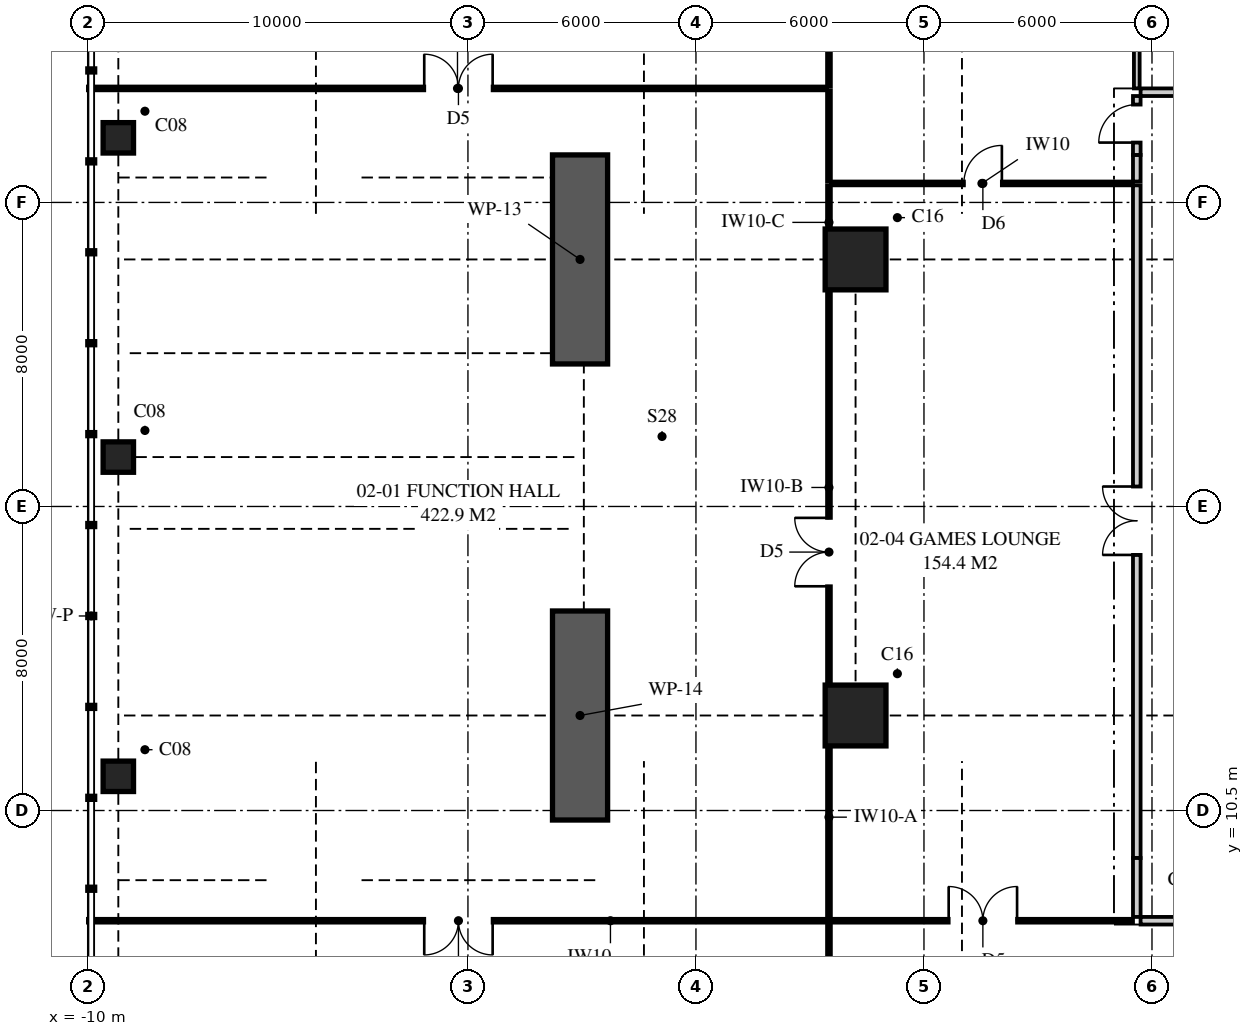
"""IFC4 building model, lengths in metres.
Left out: names, types, materials, properties, quantities, classifications, styles, units other than length and angle.
Written with IfcOpenShell. Run it as: python <this file> out.ifc"""

import sys

from ifc_helpers import new_model, si_unit, direction, frame, frame_2d, origin, origin_2d, place, context, subcontext, project, spatial, polyline, rectangle, outline, extrude, element, fill, save


model = new_model("IFC4")
c1 = context("Model", 3, precision=1e-05, world=origin(), true_north=direction((0.0, 1.0)))
c2 = subcontext(c1, "Body", "Model", "MODEL_VIEW")
j1 = project(units=[si_unit("LENGTHUNIT", "METRE"), si_unit("PLANEANGLEUNIT", "RADIAN")], contexts=[c1])
p1 = place(None, origin())
s1 = spatial("IfcSite", under=j1, at=p1, CompositionType="ELEMENT")
p2 = place(p1, origin())
s2 = spatial("IfcBuilding", under=s1, at=p2, CompositionType="ELEMENT")
p3 = place(p2, frame((0.0, 0.0, 11.0)))
s3 = spatial("IfcBuildingStorey", under=s2, at=p3, CompositionType="ELEMENT", Elevation=11.0)
for number, where, z_axis, x_axis in (
    (1, (10.2, 13.0, 0.0), (0.0, 0.0, 1.0), (1.0, 0.0, 0.0)),
    (2, (10.2, 25.0, 0.0), (0.0, 0.0, 1.0), (1.0, 0.0, 0.0)),
):
    element("IfcColumn", number, at=place(p3, frame(where, z_axis=z_axis, x_axis=x_axis)), inside=s3, PredefinedType="COLUMN", context=c2, shape_type="SweptSolid", body=[
        extrude(rectangle(XDim=1.6, YDim=1.6, at=origin_2d()), origin(), (0.0, 0.0, 1.0), 5.0),
    ])
for number, where, z_axis, x_axis in (
    (3, (-9.2, 11.4, 0.0), (0.0, 0.0, 1.0), (1.0, 0.0, 0.0)),
    (4, (-9.2, 19.8, 0.0), (0.0, 0.0, 1.0), (1.0, 0.0, 0.0)),
    (5, (-9.2, 28.2, 0.0), (0.0, 0.0, 1.0), (1.0, 0.0, 0.0)),
):
    element("IfcColumn", number, at=place(p3, frame(where, z_axis=z_axis, x_axis=x_axis)), inside=s3, PredefinedType="COLUMN", context=c2, shape_type="SweptSolid", body=[
        extrude(rectangle(XDim=0.8, YDim=0.8, at=origin_2d()), origin(), (0.0, 0.0, 1.0), 5.0),
    ])
p4 = place(p3, frame((-10.0, 29.5, 0.0), z_axis=(0.0, 0.0, 1.0), x_axis=(1.0, 0.0, 0.0)))
e6 = element("IfcWall", 6, at=p4, inside=s3, PredefinedType="PARTITIONING", context=c2, shape_type="SweptSolid", body=[
    extrude(outline(polyline([(0.0, 0.0), (19.45, 0.0), (19.45, 4.72), (15.891, 4.72), (15.891, 4.02), (13.371, 4.02), (13.371, 4.72), (7.26, 4.72), (7.26, 4.02), (4.74, 4.02), (4.74, 4.72), (1.16, 4.72), (1.16, 3.52), (0.44, 3.52), (0.44, 4.72), (0.0, 4.72), (0.0, 0.0)])), frame((0.0, 0.05, 0.0), z_axis=(0.0, -1.0, 0.0), x_axis=(1.0, 0.0, 0.0)), (0.0, 0.0, 1.0), 0.1),
])
p5 = place(p4, frame((8.85, 0.0, 0.0)))
e7 = element("IfcOpeningElement", 7, at=p5, cuts=e6, PredefinedType="OPENING", context=c2, shape_type="SweptSolid", body=[
    extrude(rectangle(XDim=1.8, YDim=2.1, at=frame_2d((0.9, 1.05))), frame((0.0, 0.06, 0.0), z_axis=(0.0, -1.0, 0.0), x_axis=(1.0, 0.0, 0.0)), (0.0, 0.0, 1.0), 0.12),
])
p6 = place(p3, frame((9.5, 7.65, 0.0), z_axis=(0.0, 0.0, 1.0), x_axis=(0.0, 1.0, 0.0)))
e8 = element("IfcWall", 8, at=p6, inside=s3, PredefinedType="PARTITIONING", context=c2, shape_type="SweptSolid", body=[
    extrude(outline(polyline([(0.0, 0.0), (5.35, 0.0), (5.35, 4.02), (4.09, 4.02), (4.09, 4.72), (0.0, 4.72), (0.0, 0.0)])), frame((0.0, 0.05, 0.0), z_axis=(0.0, -1.0, 0.0), x_axis=(1.0, 0.0, 0.0)), (0.0, 0.0, 1.0), 0.1),
])
p7 = place(p3, frame((9.5, 13.0, 0.0), z_axis=(0.0, 0.0, 1.0), x_axis=(0.0, 1.0, 0.0)))
e9 = element("IfcWall", 9, at=p7, inside=s3, PredefinedType="PARTITIONING", context=c2, shape_type="SweptSolid", body=[
    extrude(rectangle(XDim=12.0, YDim=0.1, at=frame_2d((6.0, 0.0))), origin(), (0.0, 0.0, 1.0), 4.02),
])
p8 = place(p7, frame((3.4, 0.0, 0.0)))
e10 = element("IfcOpeningElement", 10, at=p8, cuts=e9, PredefinedType="OPENING", context=c2, shape_type="SweptSolid", body=[
    extrude(rectangle(XDim=1.8, YDim=2.1, at=frame_2d((0.9, 1.05))), frame((0.0, 0.06, 0.0), z_axis=(0.0, -1.0, 0.0), x_axis=(1.0, 0.0, 0.0)), (0.0, 0.0, 1.0), 0.12),
])
p9 = place(p3, frame((9.5, 25.0, 0.0), z_axis=(0.0, 0.0, 1.0), x_axis=(0.0, 1.0, 0.0)))
e11 = element("IfcWall", 11, at=p9, inside=s3, PredefinedType="PARTITIONING", context=c2, shape_type="SweptSolid", body=[
    extrude(outline(polyline([(0.0, 0.0), (1.95, 0.0), (1.95, 4.72), (1.26, 4.72), (1.26, 4.02), (0.0, 4.02), (0.0, 0.0)])), frame((0.0, 0.05, 0.0), z_axis=(0.0, -1.0, 0.0), x_axis=(1.0, 0.0, 0.0)), (0.0, 0.0, 1.0), 0.1),
])
p10 = place(p3, frame((9.5, 27.05, 0.0), z_axis=(0.0, 0.0, 1.0), x_axis=(0.0, 1.0, 0.0)))
e12 = element("IfcWall", 12, at=p10, inside=s3, PredefinedType="PARTITIONING", context=c2, shape_type="SweptSolid", body=[
    extrude(rectangle(XDim=2.4, YDim=0.1, at=frame_2d((1.2, 0.0))), origin(), (0.0, 0.0, 1.0), 4.72),
])
p11 = place(p3, frame((-10.0, 7.6, 0.0), z_axis=(0.0, 0.0, 1.0), x_axis=(1.0, 0.0, 0.0)))
e13 = element("IfcWall", 13, at=p11, inside=s3, PredefinedType="PARTITIONING", context=c2, shape_type="SweptSolid", body=[
    extrude(outline(polyline([(0.0, 0.0), (19.45, 0.0), (19.45, 4.72), (15.891, 4.72), (15.891, 4.02), (13.371, 4.02), (13.371, 4.72), (7.26, 4.72), (7.26, 4.02), (4.74, 4.02), (4.74, 4.72), (1.16, 4.72), (1.16, 3.52), (0.44, 3.52), (0.44, 4.72), (0.0, 4.72), (0.0, 0.0)])), frame((0.0, 0.05, 0.0), z_axis=(0.0, -1.0, 0.0), x_axis=(1.0, 0.0, 0.0)), (0.0, 0.0, 1.0), 0.1),
])
p12 = place(p11, frame((8.85, 0.0, 0.0)))
e14 = element("IfcOpeningElement", 14, at=p12, cuts=e13, PredefinedType="OPENING", context=c2, shape_type="SweptSolid", body=[
    extrude(rectangle(XDim=1.8, YDim=2.1, at=frame_2d((0.9, 1.05))), frame((0.0, 0.06, 0.0), z_axis=(0.0, -1.0, 0.0), x_axis=(1.0, 0.0, 0.0)), (0.0, 0.0, 1.0), 0.12),
])
p13 = place(p3, frame((9.5, 29.55, 0.0), z_axis=(0.0, 0.0, 1.0), x_axis=(0.0, 1.0, 0.0)))
e15 = element("IfcWall", 15, at=p13, inside=s3, PredefinedType="PARTITIONING", context=c2, shape_type="SweptSolid", body=[
    extrude(outline(polyline([(0.0, 0.0), (7.6, 0.0), (7.6, 4.72), (7.6, 3.82), (6.24, 3.82), (6.24, 4.72), (0.0, 4.72), (0.0, 0.0)])), frame((0.0, 0.05, 0.0), z_axis=(0.0, -1.0, 0.0), x_axis=(1.0, 0.0, 0.0)), (0.0, 0.0, 1.0), 0.1),
])
p14 = place(p3, frame((9.55, 27.0, 0.0), z_axis=(0.0, 0.0, 1.0), x_axis=(1.0, 0.0, 0.0)))
e16 = element("IfcWall", 16, at=p14, inside=s3, PredefinedType="PARTITIONING", context=c2, shape_type="SweptSolid", body=[
    extrude(outline(polyline([(0.0, 0.0), (7.95, 0.0), (7.95, 4.72), (4.71, 4.72), (4.71, 4.02), (2.19, 4.02), (2.19, 4.72), (0.0, 4.72), (0.0, 0.0)])), frame((0.0, 0.05, 0.0), z_axis=(0.0, -1.0, 0.0), x_axis=(1.0, 0.0, 0.0)), (0.0, 0.0, 1.0), 0.1),
])
p15 = place(p14, frame((3.5, 0.0, 0.0)))
e17 = element("IfcOpeningElement", 17, at=p15, cuts=e16, PredefinedType="OPENING", context=c2, shape_type="SweptSolid", body=[
    extrude(rectangle(XDim=1.0, YDim=2.1, at=frame_2d((0.5, 1.05))), frame((0.0, 0.06, 0.0), z_axis=(0.0, -1.0, 0.0), x_axis=(1.0, 0.0, 0.0)), (0.0, 0.0, 1.0), 0.12),
])
p16 = place(p3, frame((9.55, 7.6, 0.0), z_axis=(0.0, 0.0, 1.0), x_axis=(1.0, 0.0, 0.0)))
e18 = element("IfcWall", 18, at=p16, inside=s3, PredefinedType="PARTITIONING", context=c2, shape_type="SweptSolid", body=[
    extrude(outline(polyline([(0.0, 0.0), (7.95, 0.0), (7.95, 4.72), (4.71, 4.72), (4.71, 4.02), (2.19, 4.02), (2.19, 4.72), (0.0, 4.72), (0.0, 0.0)])), frame((0.0, 0.05, 0.0), z_axis=(0.0, -1.0, 0.0), x_axis=(1.0, 0.0, 0.0)), (0.0, 0.0, 1.0), 0.1),
])
p17 = place(p16, frame((3.1, 0.0, 0.0)))
e19 = element("IfcOpeningElement", 19, at=p17, cuts=e18, PredefinedType="OPENING", context=c2, shape_type="SweptSolid", body=[
    extrude(rectangle(XDim=1.8, YDim=2.1, at=frame_2d((0.9, 1.05))), frame((0.0, 0.06, 0.0), z_axis=(0.0, -1.0, 0.0), x_axis=(1.0, 0.0, 0.0)), (0.0, 0.0, 1.0), 0.12),
])
p18 = place(p3, frame((17.6, 7.7, 0.0), z_axis=(0.0, 0.0, 1.0), x_axis=(0.0, 1.0, 0.0)))
e20 = element("IfcWall", 20, at=p18, inside=s3, PredefinedType="PARTITIONING", context=c2, shape_type="SweptSolid", body=[
    extrude(rectangle(XDim=1.55, YDim=0.2, at=frame_2d((0.775, 0.0))), origin(), (0.0, 0.0, 1.0), 4.72),
])
p19 = place(p3, frame((17.6, 9.25, 0.0), z_axis=(0.0, 0.0, 1.0), x_axis=(0.0, 1.0, 0.0)))
e21 = element("IfcWall", 21, at=p19, inside=s3, PredefinedType="PARTITIONING", context=c2, shape_type="SweptSolid", body=[
    extrude(outline(polyline([(0.0, 0.0), (17.7, 0.0), (17.7, 4.72), (17.06, 4.72), (17.06, 4.02), (14.44, 4.02), (14.44, 4.72), (5.06, 4.72), (5.06, 4.02), (2.44, 4.02), (2.44, 4.72), (0.0, 4.72), (0.0, 0.0)])), frame((0.0, 0.1, 0.0), z_axis=(0.0, -1.0, 0.0), x_axis=(1.0, 0.0, 0.0)), (0.0, 0.0, 1.0), 0.2),
])
p20 = place(p19, frame((7.975, 0.0, 0.0)))
e22 = element("IfcOpeningElement", 22, at=p20, cuts=e21, PredefinedType="OPENING", context=c2, shape_type="SweptSolid", body=[
    extrude(rectangle(XDim=1.8, YDim=2.1, at=frame_2d((0.9, 1.05))), frame((0.0, 0.11, 0.0), z_axis=(0.0, -1.0, 0.0), x_axis=(1.0, 0.0, 0.0)), (0.0, 0.0, 1.0), 0.22),
])
p21 = place(p3, frame((17.6, 27.75, 0.0), z_axis=(0.0, 0.0, 1.0), x_axis=(0.0, 1.0, 0.0)))
e23 = element("IfcWall", 23, at=p21, inside=s3, PredefinedType="PARTITIONING", context=c2, shape_type="SweptSolid", body=[
    extrude(rectangle(XDim=1.55, YDim=0.2, at=frame_2d((0.775, 0.0))), origin(), (0.0, 0.0, 1.0), 4.72),
])
p22 = place(p21, frame((0.325, 0.0, 0.0)))
e24 = element("IfcOpeningElement", 24, at=p22, cuts=e23, PredefinedType="OPENING", context=c2, shape_type="SweptSolid", body=[
    extrude(rectangle(XDim=1.0, YDim=2.1, at=frame_2d((0.5, 1.05))), frame((0.0, 0.11, 0.0), z_axis=(0.0, -1.0, 0.0), x_axis=(1.0, 0.0, 0.0)), (0.0, 0.0, 1.0), 0.22),
])
p23 = place(p3, frame((17.6, 27.05, 0.0), z_axis=(0.0, 0.0, 1.0), x_axis=(0.0, 1.0, 0.0)))
e25 = element("IfcWall", 25, at=p23, inside=s3, PredefinedType="PARTITIONING", context=c2, shape_type="SweptSolid", body=[
    extrude(rectangle(XDim=0.7, YDim=0.2, at=frame_2d((0.35, 0.0))), origin(), (0.0, 0.0, 1.0), 4.72),
])
p24 = place(p3, frame((17.6, 29.5, 0.0), z_axis=(0.0, 0.0, 1.0), x_axis=(0.0, 1.0, 0.0)))
e26 = element("IfcWall", 26, at=p24, inside=s3, PredefinedType="PLUMBINGWALL", context=c2, shape_type="SweptSolid", body=[
    extrude(rectangle(XDim=4.425, YDim=0.15, at=frame_2d((2.212, 0.0))), origin(), (0.0, 0.0, 1.0), 4.72),
])
p25 = place(p3, frame((9.5, -6.0, 0.0), z_axis=(0.0, 0.0, 1.0), x_axis=(0.0, 1.0, 0.0)))
e27 = element("IfcWall", 27, at=p25, inside=s3, PredefinedType="PARTITIONING", context=c2, shape_type="SweptSolid", body=[
    extrude(outline(polyline([(0.0, 0.0), (13.55, 0.0), (13.55, 4.72), (8.21, 4.72), (8.21, 3.82), (5.69, 3.82), (5.69, 4.72), (2.06, 4.72), (2.06, 4.02), (0.0, 4.02), (0.0, 4.72), (0.0, 0.0)])), frame((0.0, 0.05, 0.0), z_axis=(0.0, -1.0, 0.0), x_axis=(1.0, 0.0, 0.0)), (0.0, 0.0, 1.0), 0.1),
])
p26 = place(p25, frame((5.15, 0.0, 0.0)))
e28 = element("IfcOpeningElement", 28, at=p26, cuts=e27, PredefinedType="OPENING", context=c2, shape_type="SweptSolid", body=[
    extrude(rectangle(XDim=1.8, YDim=2.1, at=frame_2d((0.9, 1.05))), frame((0.0, 0.06, 0.0), z_axis=(0.0, -1.0, 0.0), x_axis=(1.0, 0.0, 0.0)), (0.0, 0.0, 1.0), 0.12),
])
p27 = place(p3, frame((17.7, 7.6, 0.0), z_axis=(0.0, 0.0, 1.0), x_axis=(1.0, 0.0, 0.0)))
e29 = element("IfcWall", 29, at=p27, inside=s3, PredefinedType="PARTITIONING", context=c2, shape_type="SweptSolid", body=[
    extrude(outline(polyline([(0.0, 0.0), (12.25, 0.0), (12.25, 4.72), (12.25, 4.02), (9.99, 4.02), (9.99, 4.72), (7.61, 4.72), (7.61, 4.02), (4.99, 4.02), (4.99, 4.72), (4.11, 4.72), (4.11, 4.02), (1.49, 4.02), (1.49, 4.72), (0.0, 4.72), (0.0, 0.0)])), frame((0.0, 0.1, 0.0), z_axis=(0.0, -1.0, 0.0), x_axis=(1.0, 0.0, 0.0)), (0.0, 0.0, 1.0), 0.2),
])
p28 = place(p27, frame((5.2, 0.0, 0.0)))
e30 = element("IfcOpeningElement", 30, at=p28, cuts=e29, PredefinedType="OPENING", context=c2, shape_type="SweptSolid", body=[
    extrude(rectangle(XDim=1.8, YDim=2.1, at=frame_2d((0.9, 1.05))), frame((0.0, 0.11, 0.0), z_axis=(0.0, -1.0, 0.0), x_axis=(1.0, 0.0, 0.0)), (0.0, 0.0, 1.0), 0.22),
])
p29 = place(p3, frame((17.7, 29.4, 0.0), z_axis=(0.0, 0.0, 1.0), x_axis=(1.0, 0.0, 0.0)))
e31 = element("IfcWall", 31, at=p29, inside=s3, PredefinedType="PARTITIONING", context=c2, shape_type="SweptSolid", body=[
    extrude(rectangle(XDim=3.041, YDim=0.2, at=frame_2d((1.521, 0.0))), origin(), (0.0, 0.0, 1.0), 4.72),
])
p30 = place(p29, frame((1.008, 0.0, 0.0)))
e32 = element("IfcOpeningElement", 32, at=p30, cuts=e31, PredefinedType="OPENING", context=c2, shape_type="SweptSolid", body=[
    extrude(rectangle(XDim=1.0, YDim=2.1, at=frame_2d((0.5, 1.05))), frame((0.0, 0.11, 0.0), z_axis=(0.0, -1.0, 0.0), x_axis=(1.0, 0.0, 0.0)), (0.0, 0.0, 1.0), 0.22),
])
for number, where, z_axis, x_axis in (
    (33, (2.95, 22.25, 0.0), (0.0, 0.0, 1.0), (0.0, 1.0, 0.0)),
    (34, (2.95, 10.25, 0.0), (0.0, 0.0, 1.0), (0.0, 1.0, 0.0)),
):
    element("IfcWall", number, at=place(p3, frame(where, z_axis=z_axis, x_axis=x_axis)), inside=s3, PredefinedType="SHEAR", context=c2, shape_type="SweptSolid", body=[
        extrude(rectangle(XDim=5.5, YDim=1.45, at=frame_2d((2.75, 0.0))), origin(), (0.0, 0.0, 1.0), 5.0),
    ])
p31 = place(p20, origin())
e35 = element("IfcDoor", 35, at=p31, inside=s3, OperationType="DOUBLE_DOOR_SINGLE_SWING", PredefinedType="DOOR", context=c2, shape_type="SweptSolid", body=[
    extrude(rectangle(XDim=1.8, YDim=2.1, at=frame_2d((0.9, 1.05))), frame((0.0, 0.025, 0.0), z_axis=(0.0, -1.0, 0.0), x_axis=(1.0, 0.0, 0.0)), (0.0, 0.0, 1.0), 0.05),
])
fill(e22, e35)
p32 = place(p8, origin())
e36 = element("IfcDoor", 36, at=p32, inside=s3, OperationType="DOUBLE_DOOR_SINGLE_SWING", PredefinedType="DOOR", context=c2, shape_type="SweptSolid", body=[
    extrude(rectangle(XDim=1.8, YDim=2.1, at=frame_2d((0.9, 1.05))), frame((0.0, 0.025, 0.0), z_axis=(0.0, -1.0, 0.0), x_axis=(1.0, 0.0, 0.0)), (0.0, 0.0, 1.0), 0.05),
])
fill(e10, e36)
p33 = place(p12, frame((1.8, 0.0, 0.0), z_axis=(0.0, 0.0, 1.0), x_axis=(-1.0, 0.0, 0.0)))
e37 = element("IfcDoor", 37, at=p33, inside=s3, OperationType="DOUBLE_DOOR_SINGLE_SWING", PredefinedType="DOOR", context=c2, shape_type="SweptSolid", body=[
    extrude(rectangle(XDim=1.8, YDim=2.1, at=frame_2d((0.9, 1.05))), frame((0.0, 0.025, 0.0), z_axis=(0.0, -1.0, 0.0), x_axis=(1.0, 0.0, 0.0)), (0.0, 0.0, 1.0), 0.05),
])
fill(e14, e37)
p34 = place(p17, origin())
e38 = element("IfcDoor", 38, at=p34, inside=s3, OperationType="DOUBLE_DOOR_SINGLE_SWING", PredefinedType="DOOR", context=c2, shape_type="SweptSolid", body=[
    extrude(rectangle(XDim=1.8, YDim=2.1, at=frame_2d((0.9, 1.05))), frame((0.0, 0.025, 0.0), z_axis=(0.0, -1.0, 0.0), x_axis=(1.0, 0.0, 0.0)), (0.0, 0.0, 1.0), 0.05),
])
fill(e19, e38)
p35 = place(p5, origin())
e39 = element("IfcDoor", 39, at=p35, inside=s3, OperationType="DOUBLE_DOOR_SINGLE_SWING", PredefinedType="DOOR", context=c2, shape_type="SweptSolid", body=[
    extrude(rectangle(XDim=1.8, YDim=2.1, at=frame_2d((0.9, 1.05))), frame((0.0, 0.025, 0.0), z_axis=(0.0, -1.0, 0.0), x_axis=(1.0, 0.0, 0.0)), (0.0, 0.0, 1.0), 0.05),
])
fill(e7, e39)
p36 = place(p22, origin())
e40 = element("IfcDoor", 40, at=p36, inside=s3, OperationType="SINGLE_SWING_LEFT", PredefinedType="DOOR", context=c2, shape_type="SweptSolid", body=[
    extrude(rectangle(XDim=1.0, YDim=2.1, at=frame_2d((0.5, 1.05))), frame((0.0, 0.025, 0.0), z_axis=(0.0, -1.0, 0.0), x_axis=(1.0, 0.0, 0.0)), (0.0, 0.0, 1.0), 0.05),
])
fill(e24, e40)
p37 = place(p15, origin())
e41 = element("IfcDoor", 41, at=p37, inside=s3, OperationType="SINGLE_SWING_RIGHT", PredefinedType="DOOR", context=c2, shape_type="SweptSolid", body=[
    extrude(rectangle(XDim=1.0, YDim=2.1, at=frame_2d((0.5, 1.05))), frame((0.0, 0.025, 0.0), z_axis=(0.0, -1.0, 0.0), x_axis=(1.0, 0.0, 0.0)), (0.0, 0.0, 1.0), 0.05),
])
fill(e17, e41)
save(model, sys.argv[1])
